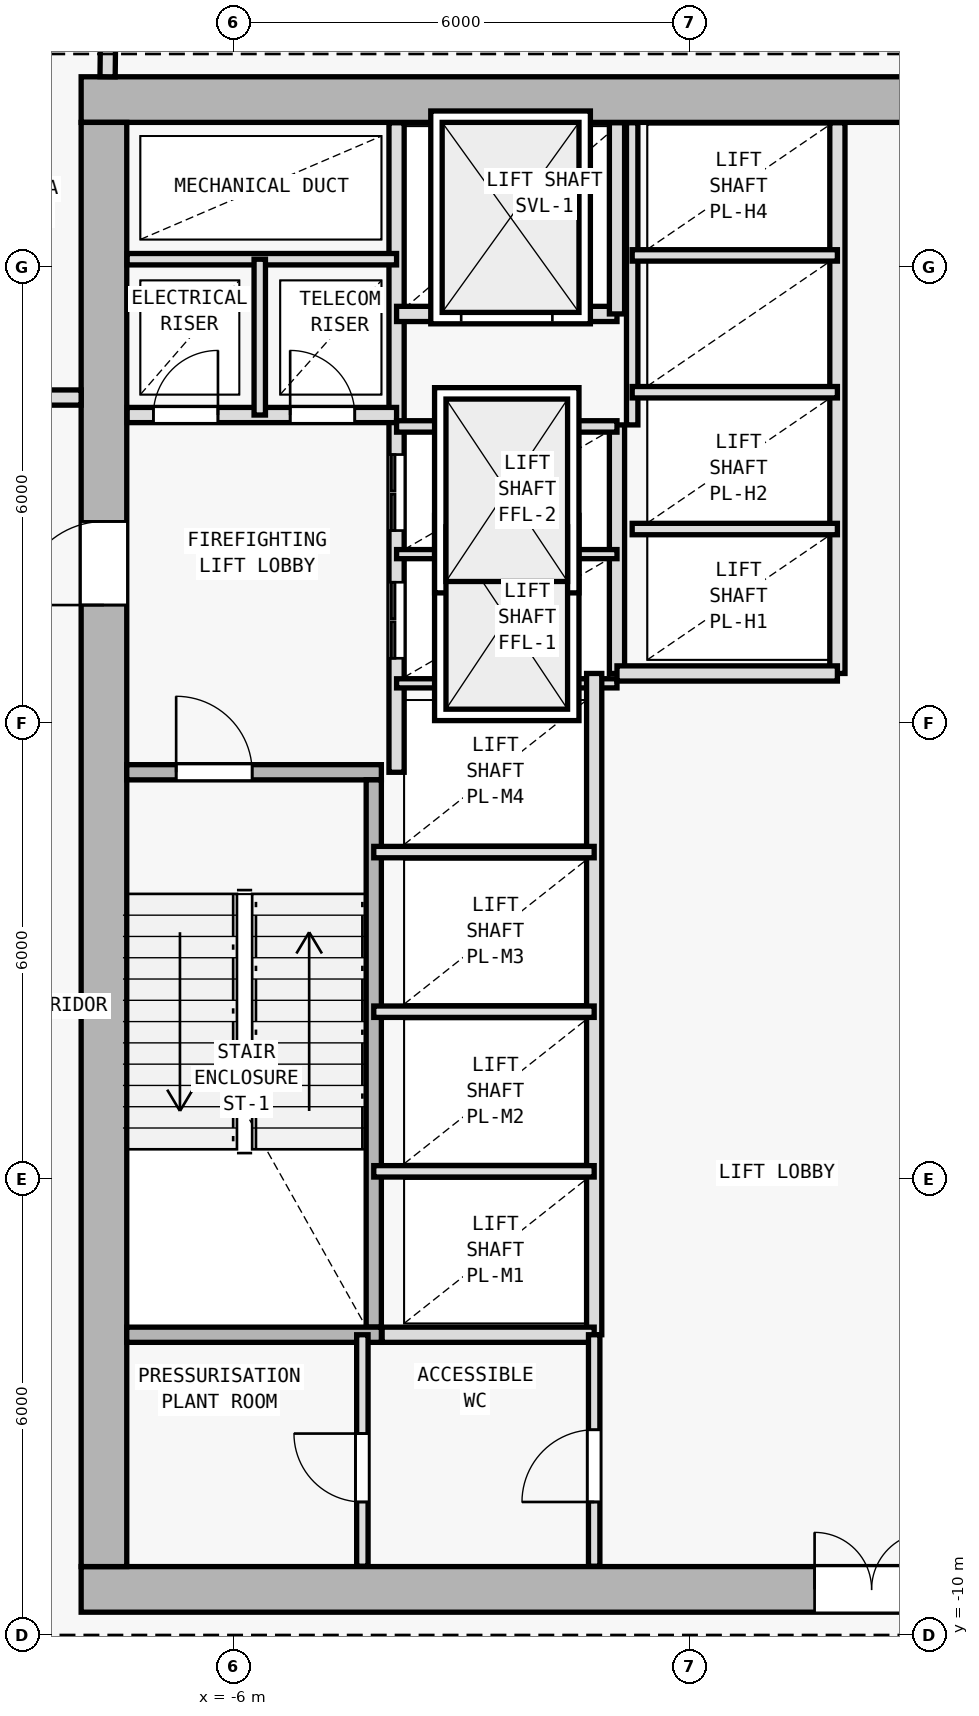
"""IFC4 building model, lengths in metres.
Left out: names, types, materials, properties, quantities, classifications, styles, units other than length and angle.
Written with IfcOpenShell. Run it as: python <this file> out.ifc"""

import sys

from ifc_helpers import new_model, si_unit, direction, frame, frame_2d, origin, origin_2d, place, context, subcontext, project, spatial, rectangle, i_section, extrude, element, fill, save


model = new_model("IFC4")
c1 = context("Model", 3, precision=1e-05, world=origin(), true_north=direction((0.0, 1.0)))
c2 = subcontext(c1, "Body", "Model", "MODEL_VIEW")
j1 = project(units=[si_unit("LENGTHUNIT", "METRE"), si_unit("PLANEANGLEUNIT", "RADIAN")], contexts=[c1])
p1 = place(None, origin())
s1 = spatial("IfcSite", under=j1, at=p1, CompositionType="ELEMENT")
p2 = place(p1, origin())
s2 = spatial("IfcBuilding", under=s1, at=p2, CompositionType="ELEMENT")
p3 = place(p2, frame((0.0, 0.0, 73.2)))
s3 = spatial("IfcBuildingStorey", under=s2, at=p3, CompositionType="ELEMENT", Elevation=73.2)
for number, where, z_axis, x_axis in (
    (1, (-7.7, -9.4, 0.0), (0.0, 0.0, 1.0), (1.0, 0.0, 0.0)),
    (2, (-7.7, 10.2, 0.0), (0.0, 0.0, 1.0), (1.0, 0.0, 0.0)),
    (3, (0.0, -9.4, 0.0), (0.0, 0.0, 1.0), (1.0, 0.0, 0.0)),
    (4, (-7.7, 2.0, 0.0), (0.0, 0.0, 1.0), (1.0, 0.0, 0.0)),
):
    element("IfcColumn", number, at=place(p3, frame(where, z_axis=z_axis, x_axis=x_axis)), inside=s3, PredefinedType="COLUMN", context=c2, shape_type="SweptSolid", body=[
        extrude(i_section(OverallWidth=0.416, OverallDepth=0.446, WebThickness=0.025, FlangeThickness=0.04, FilletRadius=0.015, at=origin_2d()), origin(), (0.0, 0.0, 1.0), 4.8),
    ])
p4 = place(p3, frame((-8.0, -9.4, 0.0), z_axis=(0.0, 0.0, 1.0), x_axis=(1.0, 0.0, 0.0)))
e5 = element("IfcWall", 5, at=p4, inside=s3, PredefinedType="SHEAR", context=c2, shape_type="SweptSolid", body=[
    extrude(rectangle(XDim=16.0, YDim=0.6, at=frame_2d((8.0, 0.0))), origin(), (0.0, 0.0, 1.0), 4.5),
])
p5 = place(p4, frame((9.65, 0.0, 0.0)))
e6 = element("IfcOpeningElement", 6, at=p5, cuts=e5, PredefinedType="OPENING", context=c2, shape_type="SweptSolid", body=[
    extrude(rectangle(XDim=1.5, YDim=2.2, at=frame_2d((0.75, 1.1))), frame((0.0, 0.31, 0.0), z_axis=(0.0, -1.0, 0.0), x_axis=(1.0, 0.0, 0.0)), (0.0, 0.0, 1.0), 0.62),
])
p6 = place(p3, frame((8.0, 10.2, 0.0), z_axis=(0.0, 0.0, 1.0), x_axis=(-1.0, 0.0, 0.0)))
e7 = element("IfcWall", 7, at=p6, inside=s3, PredefinedType="SHEAR", context=c2, shape_type="SweptSolid", body=[
    extrude(rectangle(XDim=16.0, YDim=0.6, at=frame_2d((8.0, 0.0))), origin(), (0.0, 0.0, 1.0), 4.5),
])
p7 = place(p3, frame((-7.7, -9.1, 0.0), z_axis=(0.0, 0.0, 1.0), x_axis=(0.0, 1.0, 0.0)))
e8 = element("IfcWall", 8, at=p7, inside=s3, PredefinedType="SHEAR", context=c2, shape_type="SweptSolid", body=[
    extrude(rectangle(XDim=19.0, YDim=0.6, at=frame_2d((9.5, 0.0))), origin(), (0.0, 0.0, 1.0), 4.5),
])
p8 = place(p7, frame((12.65, 0.0, 0.0)))
e9 = element("IfcOpeningElement", 9, at=p8, cuts=e8, PredefinedType="OPENING", context=c2, shape_type="SweptSolid", body=[
    extrude(rectangle(XDim=1.1, YDim=2.15, at=frame_2d((0.55, 1.075))), frame((0.0, 0.31, 0.0), z_axis=(0.0, -1.0, 0.0), x_axis=(1.0, 0.0, 0.0)), (0.0, 0.0, 1.0), 0.62),
])
p9 = place(p3, frame((-7.4, 1.35, 0.0), z_axis=(0.0, 0.0, 1.0), x_axis=(1.0, 0.0, 0.0)))
e10 = element("IfcWall", 10, at=p9, inside=s3, PredefinedType="SOLIDWALL", context=c2, shape_type="SweptSolid", body=[
    extrude(rectangle(XDim=3.35, YDim=0.2, at=frame_2d((1.675, 0.0))), origin(), (0.0, 0.0, 1.0), 4.5),
])
p10 = place(p9, frame((0.65, 0.0, 0.0)))
e11 = element("IfcOpeningElement", 11, at=p10, cuts=e10, PredefinedType="OPENING", context=c2, shape_type="SweptSolid", body=[
    extrude(rectangle(XDim=1.0, YDim=2.15, at=frame_2d((0.5, 1.075))), frame((0.0, 0.11, 0.0), z_axis=(0.0, -1.0, 0.0), x_axis=(1.0, 0.0, 0.0)), (0.0, 0.0, 1.0), 0.22),
])
p11 = place(p3, frame((-4.15, -5.95, 0.0), z_axis=(0.0, 0.0, 1.0), x_axis=(0.0, 1.0, 0.0)))
e12 = element("IfcWall", 12, at=p11, inside=s3, PredefinedType="SOLIDWALL", context=c2, shape_type="SweptSolid", body=[
    extrude(rectangle(XDim=7.2, YDim=0.2, at=frame_2d((3.6, 0.0))), origin(), (0.0, 0.0, 1.0), 4.5),
])
p12 = place(p3, frame((-3.85, 1.35, 0.0), z_axis=(0.0, 0.0, 1.0), x_axis=(0.0, 1.0, 0.0)))
e13 = element("IfcWall", 13, at=p12, inside=s3, PredefinedType="SOLIDWALL", context=c2, shape_type="SweptSolid", body=[
    extrude(rectangle(XDim=8.545, YDim=0.2, at=frame_2d((4.272, 0.0))), origin(), (0.0, 0.0, 1.0), 4.5),
])
p13 = place(p12, frame((1.5, 0.0, 0.0)))
e14 = element("IfcOpeningElement", 14, at=p13, cuts=e13, PredefinedType="OPENING", context=c2, shape_type="SweptSolid", body=[
    extrude(rectangle(XDim=1.0, YDim=2.15, at=frame_2d((0.5, 1.075))), frame((0.0, 0.11, 0.0), z_axis=(0.0, -1.0, 0.0), x_axis=(1.0, 0.0, 0.0)), (0.0, 0.0, 1.0), 0.22),
])
p14 = place(p12, frame((3.18, 0.0, 0.0)))
e15 = element("IfcOpeningElement", 15, at=p14, cuts=e13, PredefinedType="OPENING", context=c2, shape_type="SweptSolid", body=[
    extrude(rectangle(XDim=1.0, YDim=2.15, at=frame_2d((0.5, 1.075))), frame((0.0, 0.11, 0.0), z_axis=(0.0, -1.0, 0.0), x_axis=(1.0, 0.0, 0.0)), (0.0, 0.0, 1.0), 0.22),
])
p15 = place(p3, frame((-7.395, 6.05, 0.0), z_axis=(0.0, 0.0, 1.0), x_axis=(1.0, 0.0, 0.0)))
e16 = element("IfcWall", 16, at=p15, inside=s3, PredefinedType="SOLIDWALL", context=c2, shape_type="SweptSolid", body=[
    extrude(rectangle(XDim=3.545, YDim=0.2, at=frame_2d((1.772, 0.0))), origin(), (0.0, 0.0, 1.0), 4.5),
])
p16 = place(p15, frame((0.345, 0.0, 0.0)))
e17 = element("IfcOpeningElement", 17, at=p16, cuts=e16, PredefinedType="OPENING", context=c2, shape_type="SweptSolid", body=[
    extrude(rectangle(XDim=0.85, YDim=2.1, at=frame_2d((0.425, 1.05))), frame((0.0, 0.11, 0.0), z_axis=(0.0, -1.0, 0.0), x_axis=(1.0, 0.0, 0.0)), (0.0, 0.0, 1.0), 0.22),
])
p17 = place(p15, frame((2.145, 0.0, 0.0)))
e18 = element("IfcOpeningElement", 18, at=p17, cuts=e16, PredefinedType="OPENING", context=c2, shape_type="SweptSolid", body=[
    extrude(rectangle(XDim=0.85, YDim=2.1, at=frame_2d((0.425, 1.05))), frame((0.0, 0.11, 0.0), z_axis=(0.0, -1.0, 0.0), x_axis=(1.0, 0.0, 0.0)), (0.0, 0.0, 1.0), 0.22),
])
p18 = place(p3, frame((-7.395, 8.1, 0.0), z_axis=(0.0, 0.0, 1.0), x_axis=(1.0, 0.0, 0.0)))
e19 = element("IfcWall", 19, at=p18, inside=s3, PredefinedType="PARTITIONING", context=c2, shape_type="SweptSolid", body=[
    extrude(rectangle(XDim=3.545, YDim=0.15, at=frame_2d((1.772, 0.0))), origin(), (0.0, 0.0, 1.0), 4.5),
])
p19 = place(p3, frame((-5.65, 6.05, 0.0), z_axis=(0.0, 0.0, 1.0), x_axis=(0.0, 1.0, 0.0)))
e20 = element("IfcWall", 20, at=p19, inside=s3, PredefinedType="PARTITIONING", context=c2, shape_type="SweptSolid", body=[
    extrude(rectangle(XDim=2.05, YDim=0.15, at=frame_2d((1.025, 0.0))), origin(), (0.0, 0.0, 1.0), 4.5),
])
p20 = place(p3, frame((-0.95, 2.65, 0.0), z_axis=(0.0, 0.0, 1.0), x_axis=(0.0, 1.0, 0.0)))
e21 = element("IfcWall", 21, at=p20, inside=s3, PredefinedType="SOLIDWALL", context=c2, shape_type="SweptSolid", body=[
    extrude(rectangle(XDim=3.27, YDim=0.2, at=frame_2d((1.635, 0.0))), origin(), (0.0, 0.0, 1.0), 4.5),
])
for number, where, z_axis, x_axis in (
    (22, (-3.85, 2.52, 0.0), (0.0, 0.0, 1.0), (1.0, 0.0, 0.0)),
    (23, (-3.85, 4.22, 0.0), (0.0, 0.0, 1.0), (1.0, 0.0, 0.0)),
):
    element("IfcWall", number, at=place(p3, frame(where, z_axis=z_axis, x_axis=x_axis)), inside=s3, PredefinedType="PARTITIONING", context=c2, shape_type="SweptSolid", body=[
        extrude(rectangle(XDim=2.9, YDim=0.12, at=frame_2d((1.45, 0.0))), origin(), (0.0, 0.0, 1.0), 4.5),
    ])
p21 = place(p3, frame((-3.85, 5.9, 0.0), z_axis=(0.0, 0.0, 1.0), x_axis=(1.0, 0.0, 0.0)))
e24 = element("IfcWall", 24, at=p21, inside=s3, PredefinedType="PARTITIONING", context=c2, shape_type="SweptSolid", body=[
    extrude(rectangle(XDim=2.9, YDim=0.15, at=frame_2d((1.45, 0.0))), origin(), (0.0, 0.0, 1.0), 4.5),
])
p22 = place(p3, frame((-3.85, 7.38, 0.0), z_axis=(0.0, 0.0, 1.0), x_axis=(1.0, 0.0, 0.0)))
e25 = element("IfcWall", 25, at=p22, inside=s3, PredefinedType="SOLIDWALL", context=c2, shape_type="SweptSolid", body=[
    extrude(rectangle(XDim=2.9, YDim=0.2, at=frame_2d((1.45, 0.0))), origin(), (0.0, 0.0, 1.0), 4.5),
])
p23 = place(p22, frame((0.85, 0.0, 0.0)))
e26 = element("IfcOpeningElement", 26, at=p23, cuts=e25, PredefinedType="OPENING", context=c2, shape_type="SweptSolid", body=[
    extrude(rectangle(XDim=1.2, YDim=2.2, at=frame_2d((0.6, 1.1))), frame((0.0, 0.11, 0.0), z_axis=(0.0, -1.0, 0.0), x_axis=(1.0, 0.0, 0.0)), (0.0, 0.0, 1.0), 0.22),
])
p24 = place(p3, frame((-0.95, 7.38, 0.0), z_axis=(0.0, 0.0, 1.0), x_axis=(0.0, 1.0, 0.0)))
e27 = element("IfcWall", 27, at=p24, inside=s3, PredefinedType="SOLIDWALL", context=c2, shape_type="SweptSolid", body=[
    extrude(rectangle(XDim=2.515, YDim=0.2, at=frame_2d((1.258, 0.0))), origin(), (0.0, 0.0, 1.0), 4.5),
])
p25 = place(p3, frame((-1.25, -6.05, 0.0), z_axis=(0.0, 0.0, 1.0), x_axis=(0.0, 1.0, 0.0)))
e28 = element("IfcWall", 28, at=p25, inside=s3, PredefinedType="SOLIDWALL", context=c2, shape_type="SweptSolid", body=[
    extrude(rectangle(XDim=8.7, YDim=0.2, at=frame_2d((4.35, 0.0))), origin(), (0.0, 0.0, 1.0), 4.5),
])
for number, where, z_axis, x_axis in (
    (29, (-4.15, -3.9, 0.0), (0.0, 0.0, 1.0), (1.0, 0.0, 0.0)),
    (30, (-4.15, -1.8, 0.0), (0.0, 0.0, 1.0), (1.0, 0.0, 0.0)),
    (31, (-4.15, 0.3, 0.0), (0.0, 0.0, 1.0), (1.0, 0.0, 0.0)),
):
    element("IfcWall", number, at=place(p3, frame(where, z_axis=z_axis, x_axis=x_axis)), inside=s3, PredefinedType="PARTITIONING", context=c2, shape_type="SweptSolid", body=[
        extrude(rectangle(XDim=2.9, YDim=0.15, at=frame_2d((1.45, 0.0))), origin(), (0.0, 0.0, 1.0), 4.5),
    ])
p26 = place(p3, frame((1.95, 2.65, 0.0), z_axis=(0.0, 0.0, 1.0), x_axis=(0.0, 1.0, 0.0)))
e32 = element("IfcWall", 32, at=p26, inside=s3, PredefinedType="SOLIDWALL", context=c2, shape_type="SweptSolid", body=[
    extrude(rectangle(XDim=7.245, YDim=0.2, at=frame_2d((3.623, 0.0))), origin(), (0.0, 0.0, 1.0), 4.5),
])
p27 = place(p3, frame((-0.95, 2.65, 0.0), z_axis=(0.0, 0.0, 1.0), x_axis=(1.0, 0.0, 0.0)))
e33 = element("IfcWall", 33, at=p27, inside=s3, PredefinedType="SOLIDWALL", context=c2, shape_type="SweptSolid", body=[
    extrude(rectangle(XDim=2.9, YDim=0.2, at=frame_2d((1.45, 0.0))), origin(), (0.0, 0.0, 1.0), 4.5),
])
p28 = place(p3, frame((-0.75, 5.92, 0.0), z_axis=(0.0, 0.0, 1.0), x_axis=(0.0, 1.0, 0.0)))
e34 = element("IfcWall", 34, at=p28, inside=s3, PredefinedType="PARTITIONING", context=c2, shape_type="SweptSolid", body=[
    extrude(rectangle(XDim=3.975, YDim=0.15, at=frame_2d((1.988, 0.0))), origin(), (0.0, 0.0, 1.0), 4.5),
])
for number, where, z_axis, x_axis in (
    (35, (-0.75, 4.55, 0.0), (0.0, 0.0, 1.0), (1.0, 0.0, 0.0)),
    (36, (-0.75, 6.35, 0.0), (0.0, 0.0, 1.0), (1.0, 0.0, 0.0)),
    (37, (-0.75, 8.15, 0.0), (0.0, 0.0, 1.0), (1.0, 0.0, 0.0)),
):
    element("IfcWall", number, at=place(p3, frame(where, z_axis=z_axis, x_axis=x_axis)), inside=s3, PredefinedType="PARTITIONING", context=c2, shape_type="SweptSolid", body=[
        extrude(rectangle(XDim=2.7, YDim=0.15, at=frame_2d((1.35, 0.0))), origin(), (0.0, 0.0, 1.0), 4.5),
    ])
p29 = place(p3, frame((-7.4, -6.05, 0.0), z_axis=(0.0, 0.0, 1.0), x_axis=(1.0, 0.0, 0.0)))
e38 = element("IfcWall", 38, at=p29, inside=s3, PredefinedType="SOLIDWALL", context=c2, shape_type="SweptSolid", body=[
    extrude(rectangle(XDim=3.35, YDim=0.2, at=frame_2d((1.675, 0.0))), origin(), (0.0, 0.0, 1.0), 4.5),
])
p30 = place(p3, frame((-4.04, -6.05, 0.0), z_axis=(0.0, 0.0, 1.0), x_axis=(1.0, 0.0, 0.0)))
e39 = element("IfcWall", 39, at=p30, inside=s3, PredefinedType="SOLIDWALL", context=c2, shape_type="SweptSolid", body=[
    extrude(rectangle(XDim=2.79, YDim=0.2, at=frame_2d((1.395, 0.0))), origin(), (0.0, 0.0, 1.0), 4.5),
])
p31 = place(p3, frame((-1.25, -9.095, 0.0), z_axis=(0.0, 0.0, 1.0), x_axis=(0.0, 1.0, 0.0)))
e40 = element("IfcWall", 40, at=p31, inside=s3, PredefinedType="PARTITIONING", context=c2, shape_type="SweptSolid", body=[
    extrude(rectangle(XDim=3.045, YDim=0.15, at=frame_2d((1.522, 0.0))), origin(), (0.0, 0.0, 1.0), 4.5),
])
p32 = place(p31, frame((0.845, 0.0, 0.0)))
e41 = element("IfcOpeningElement", 41, at=p32, cuts=e40, PredefinedType="OPENING", context=c2, shape_type="SweptSolid", body=[
    extrude(rectangle(XDim=0.95, YDim=2.1, at=frame_2d((0.475, 1.05))), frame((0.0, 0.085, 0.0), z_axis=(0.0, -1.0, 0.0), x_axis=(1.0, 0.0, 0.0)), (0.0, 0.0, 1.0), 0.17),
])
p33 = place(p3, frame((-4.3, -9.095, 0.0), z_axis=(0.0, 0.0, 1.0), x_axis=(0.0, 1.0, 0.0)))
e42 = element("IfcWall", 42, at=p33, inside=s3, PredefinedType="PARTITIONING", context=c2, shape_type="SweptSolid", body=[
    extrude(rectangle(XDim=3.045, YDim=0.15, at=frame_2d((1.522, 0.0))), origin(), (0.0, 0.0, 1.0), 4.5),
])
p34 = place(p33, frame((0.845, 0.0, 0.0)))
e43 = element("IfcOpeningElement", 43, at=p34, cuts=e42, PredefinedType="OPENING", context=c2, shape_type="SweptSolid", body=[
    extrude(rectangle(XDim=0.9, YDim=2.1, at=frame_2d((0.45, 1.05))), frame((0.0, 0.085, 0.0), z_axis=(0.0, -1.0, 0.0), x_axis=(1.0, 0.0, 0.0)), (0.0, 0.0, 1.0), 0.17),
])
p35 = place(p3, frame((-15.229, 2.527, 0.0), z_axis=(0.0, 0.0, 1.0), x_axis=(0.562470451541, 0.826817386817, 0.0)))
e44 = element("IfcWall", 44, at=p35, inside=s3, PredefinedType="PARTITIONING", context=c2, shape_type="SweptSolid", body=[
    extrude(rectangle(XDim=13.777, YDim=0.15, at=frame_2d((6.888, 0.0))), origin(), (0.0, 0.0, 1.0), 3.875),
])
p36 = place(p3, frame((-9.83, 6.28, 0.0), z_axis=(0.0, 0.0, 1.0), x_axis=(1.0, 0.0, 0.0)))
e45 = element("IfcWall", 45, at=p36, inside=s3, PredefinedType="SOLIDWALL", context=c2, shape_type="SweptSolid", body=[
    extrude(rectangle(XDim=1.83, YDim=0.2, at=frame_2d((0.915, 0.0))), origin(), (0.0, 0.0, 1.0), 3.925),
])
p37 = place(p36, frame((0.565, 0.0, 0.0)))
e46 = element("IfcOpeningElement", 46, at=p37, cuts=e45, PredefinedType="OPENING", context=c2, shape_type="SweptSolid", body=[
    extrude(rectangle(XDim=0.85, YDim=2.1, at=frame_2d((0.425, 1.05))), frame((0.0, 0.11, 0.0), z_axis=(0.0, -1.0, 0.0), x_axis=(1.0, 0.0, 0.0)), (0.0, 0.0, 1.0), 0.22),
])
p38 = place(p3, frame((-7.652, 10.5, 0.0), z_axis=(0.0, 0.0, 1.0), x_axis=(0.011402914465, 0.999934984657, 0.0)))
e47 = element("IfcWall", 47, at=p38, inside=s3, PredefinedType="SOLIDWALL", context=c2, shape_type="SweptSolid", body=[
    extrude(rectangle(XDim=2.912, YDim=0.2, at=frame_2d((1.456, 0.0))), origin(), (0.0, 0.0, 1.0), 3.875),
])
p39 = place(p5, origin())
e48 = element("IfcDoor", 48, at=p39, inside=s3, OperationType="DOUBLE_DOOR_SINGLE_SWING", PredefinedType="DOOR", context=c2, shape_type="SweptSolid", body=[
    extrude(rectangle(XDim=1.5, YDim=2.2, at=frame_2d((0.75, 1.1))), frame((0.0, 0.025, 0.0), z_axis=(0.0, -1.0, 0.0), x_axis=(1.0, 0.0, 0.0)), (0.0, 0.0, 1.0), 0.05),
])
fill(e6, e48)
p40 = place(p8, origin())
e49 = element("IfcDoor", 49, at=p40, inside=s3, OperationType="SINGLE_SWING_LEFT", PredefinedType="DOOR", context=c2, shape_type="SweptSolid", body=[
    extrude(rectangle(XDim=1.1, YDim=2.15, at=frame_2d((0.55, 1.075))), frame((0.0, 0.025, 0.0), z_axis=(0.0, -1.0, 0.0), x_axis=(1.0, 0.0, 0.0)), (0.0, 0.0, 1.0), 0.05),
])
fill(e9, e49)
p41 = place(p10, origin())
e50 = element("IfcDoor", 50, at=p41, inside=s3, OperationType="SINGLE_SWING_LEFT", PredefinedType="DOOR", context=c2, shape_type="SweptSolid", body=[
    extrude(rectangle(XDim=1.0, YDim=2.15, at=frame_2d((0.5, 1.075))), frame((0.0, 0.025, 0.0), z_axis=(0.0, -1.0, 0.0), x_axis=(1.0, 0.0, 0.0)), (0.0, 0.0, 1.0), 0.05),
])
fill(e11, e50)
p42 = place(p16, origin())
e51 = element("IfcDoor", 51, at=p42, inside=s3, OperationType="SINGLE_SWING_RIGHT", PredefinedType="DOOR", context=c2, shape_type="SweptSolid", body=[
    extrude(rectangle(XDim=0.85, YDim=2.1, at=frame_2d((0.425, 1.05))), frame((0.0, 0.025, 0.0), z_axis=(0.0, -1.0, 0.0), x_axis=(1.0, 0.0, 0.0)), (0.0, 0.0, 1.0), 0.05),
])
fill(e17, e51)
p43 = place(p17, origin())
e52 = element("IfcDoor", 52, at=p43, inside=s3, OperationType="SINGLE_SWING_LEFT", PredefinedType="DOOR", context=c2, shape_type="SweptSolid", body=[
    extrude(rectangle(XDim=0.85, YDim=2.1, at=frame_2d((0.425, 1.05))), frame((0.0, 0.025, 0.0), z_axis=(0.0, -1.0, 0.0), x_axis=(1.0, 0.0, 0.0)), (0.0, 0.0, 1.0), 0.05),
])
fill(e18, e52)
p44 = place(p23, origin())
e53 = element("IfcDoor", 53, at=p44, inside=s3, OperationType="DOUBLE_DOOR_SLIDING", PredefinedType="DOOR", context=c2, shape_type="SweptSolid", body=[
    extrude(rectangle(XDim=1.2, YDim=2.2, at=frame_2d((0.6, 1.1))), frame((0.0, 0.025, 0.0), z_axis=(0.0, -1.0, 0.0), x_axis=(1.0, 0.0, 0.0)), (0.0, 0.0, 1.0), 0.05),
])
fill(e26, e53)
p45 = place(p13, origin())
e54 = element("IfcDoor", 54, at=p45, inside=s3, OperationType="DOUBLE_DOOR_SLIDING", PredefinedType="DOOR", context=c2, shape_type="SweptSolid", body=[
    extrude(rectangle(XDim=1.0, YDim=2.15, at=frame_2d((0.5, 1.075))), frame((0.0, 0.025, 0.0), z_axis=(0.0, -1.0, 0.0), x_axis=(1.0, 0.0, 0.0)), (0.0, 0.0, 1.0), 0.05),
])
fill(e14, e54)
p46 = place(p14, origin())
e55 = element("IfcDoor", 55, at=p46, inside=s3, OperationType="DOUBLE_DOOR_SLIDING", PredefinedType="DOOR", context=c2, shape_type="SweptSolid", body=[
    extrude(rectangle(XDim=1.0, YDim=2.15, at=frame_2d((0.5, 1.075))), frame((0.0, 0.025, 0.0), z_axis=(0.0, -1.0, 0.0), x_axis=(1.0, 0.0, 0.0)), (0.0, 0.0, 1.0), 0.05),
])
fill(e15, e55)
p47 = place(p32, origin())
e56 = element("IfcDoor", 56, at=p47, inside=s3, OperationType="SINGLE_SWING_LEFT", PredefinedType="DOOR", context=c2, shape_type="SweptSolid", body=[
    extrude(rectangle(XDim=0.95, YDim=2.1, at=frame_2d((0.475, 1.05))), frame((0.0, 0.025, 0.0), z_axis=(0.0, -1.0, 0.0), x_axis=(1.0, 0.0, 0.0)), (0.0, 0.0, 1.0), 0.05),
])
fill(e41, e56)
p48 = place(p34, origin())
e57 = element("IfcDoor", 57, at=p48, inside=s3, OperationType="SINGLE_SWING_RIGHT", PredefinedType="DOOR", context=c2, shape_type="SweptSolid", body=[
    extrude(rectangle(XDim=0.9, YDim=2.1, at=frame_2d((0.45, 1.05))), frame((0.0, 0.025, 0.0), z_axis=(0.0, -1.0, 0.0), x_axis=(1.0, 0.0, 0.0)), (0.0, 0.0, 1.0), 0.05),
])
fill(e43, e57)
save(model, sys.argv[1])
